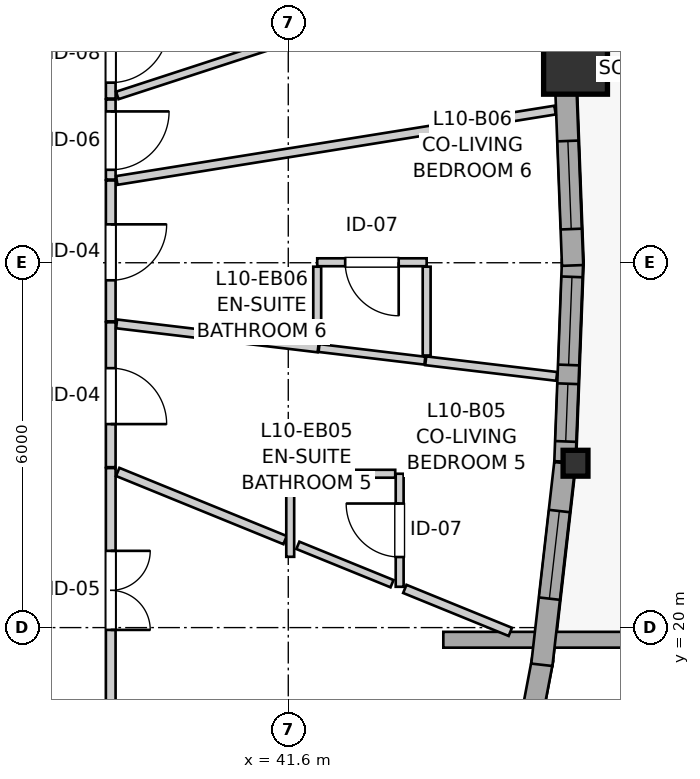
"""IFC4 building model, lengths in metres.
Left out: names, types, materials, properties, quantities, classifications, styles, units other than length and angle.
Written with IfcOpenShell. Run it as: python <this file> out.ifc"""

import sys

from ifc_helpers import new_model, si_unit, direction, frame, frame_2d, origin, origin_2d, place, context, subcontext, project, spatial, rectangle, i_section, extrude, source, transform, mapped, element, fill, save


model = new_model("IFC4")
c1 = context("Model", 3, precision=1e-05, world=origin(), true_north=direction((0.0, 1.0)))
c2 = subcontext(c1, "Body", "Model", "MODEL_VIEW")
j1 = project(units=[si_unit("LENGTHUNIT", "METRE"), si_unit("PLANEANGLEUNIT", "RADIAN")], contexts=[c1])
p1 = place(None, origin())
s1 = spatial("IfcSite", under=j1, at=p1, CompositionType="ELEMENT")
p2 = place(p1, origin())
s2 = spatial("IfcBuilding", under=s1, at=p2, CompositionType="ELEMENT")
p3 = place(p2, frame((0.0, 0.0, 36.6)))
s3 = spatial("IfcBuildingStorey", under=s2, at=p3, CompositionType="ELEMENT", Elevation=36.6)
m1 = source(origin(), c2, "Body", "SweptSolid", [
    extrude(i_section(OverallWidth=0.409, OverallDepth=0.425, WebThickness=0.03, FlangeThickness=0.048, FilletRadius=0.015, at=origin_2d()), origin(), (0.0, 0.0, 1.0), 2.94),
])
p4 = place(p3, frame((46.324, 22.703, 0.0), z_axis=(0.0, 0.0, 1.0), x_axis=(1.0, 0.0, 0.0)))
e1 = element("IfcColumn", 1, at=p4, inside=s3, PredefinedType="PILASTER", context=c2, shape_type="MappedRepresentation", body=[
    mapped(m1, transform((0.0, 0.0, 0.0), x_axis=(1.0, 0.0, 0.0), y_axis=(0.0, 1.0, 0.0), z_axis=(0.0, 0.0, 1.0), scale=1.0)),
])
m2 = source(origin(), c2, "Body", "SweptSolid", [
    extrude(rectangle(XDim=1.05, YDim=1.05, at=origin_2d()), origin(), (0.0, 0.0, 1.0), 2.94),
])
p5 = place(p3, frame((46.324, 29.297, 0.0), z_axis=(0.0, 0.0, 1.0), x_axis=(1.0, 0.0, 0.0)))
e2 = element("IfcColumn", 2, at=p5, inside=s3, PredefinedType="COLUMN", context=c2, shape_type="MappedRepresentation", body=[
    mapped(m2, transform((0.0, 0.0, 0.0), x_axis=(1.0, 0.0, 0.0), y_axis=(0.0, 1.0, 0.0), z_axis=(0.0, 0.0, 1.0), scale=1.0)),
])
p6 = place(p3, frame((44.15, 19.8, 0.0), z_axis=(0.0, 0.0, 1.0), x_axis=(1.0, 0.0, 0.0)))
e3 = element("IfcWall", 3, at=p6, inside=s3, PredefinedType="PARAPET", context=c2, shape_type="SweptSolid", body=[
    extrude(rectangle(XDim=21.104, YDim=0.26, at=frame_2d((10.552, 0.0))), origin(), (0.0, 0.0, 1.0), 0.55),
])
p7 = place(p3, frame((45.206, 16.437, 0.0), z_axis=(0.0, 0.0, 1.0), x_axis=(0.186622565297, 0.982431686237, 0.0)))
e4 = element("IfcWall", 4, at=p7, inside=s3, PredefinedType="SOLIDWALL", context=c2, shape_type="SweptSolid", body=[
    extrude(rectangle(XDim=3.094, YDim=0.35, at=frame_2d((1.547, 0.0))), origin(), (0.0, 0.0, 1.0), 2.42),
])
p8 = place(p7, frame((0.817, 0.0, 0.82)))
e5 = element("IfcOpeningElement", 5, at=p8, cuts=e4, PredefinedType="OPENING", context=c2, shape_type="SweptSolid", body=[
    extrude(rectangle(XDim=1.45, YDim=1.25, at=frame_2d((0.725, 0.625))), frame((0.0, 0.185, 0.0), z_axis=(0.0, -1.0, 0.0), x_axis=(1.0, 0.0, 0.0)), (0.0, 0.0, 1.0), 0.37),
])
p9 = place(p3, frame((45.77, 19.388, 0.0), z_axis=(0.0, 0.0, 1.0), x_axis=(0.113282408476, 0.993562829382, 0.0)))
e6 = element("IfcWall", 6, at=p9, inside=s3, PredefinedType="SOLIDWALL", context=c2, shape_type="SweptSolid", body=[
    extrude(rectangle(XDim=3.336, YDim=0.35, at=frame_2d((1.668, 0.0))), origin(), (0.0, 0.0, 1.0), 2.42),
])
p10 = place(p9, frame((1.095, 0.0, 0.82)))
e7 = element("IfcOpeningElement", 7, at=p10, cuts=e6, PredefinedType="OPENING", context=c2, shape_type="SweptSolid", body=[
    extrude(rectangle(XDim=1.45, YDim=1.25, at=frame_2d((0.725, 0.625))), frame((0.0, 0.185, 0.0), z_axis=(0.0, -1.0, 0.0), x_axis=(1.0, 0.0, 0.0)), (0.0, 0.0, 1.0), 0.37),
])
p11 = place(p3, frame((46.15, 22.729, 0.0), z_axis=(0.0, 0.0, 1.0), x_axis=(0.03797244671, 0.999278786571, 0.0)))
e8 = element("IfcWall", 8, at=p11, inside=s3, PredefinedType="SOLIDWALL", context=c2, shape_type="SweptSolid", body=[
    extrude(rectangle(XDim=3.318, YDim=0.35, at=frame_2d((1.659, 0.0))), origin(), (0.0, 0.0, 1.0), 2.42),
])
p12 = place(p11, frame((0.332, 0.0, 0.82)))
e9 = element("IfcOpeningElement", 9, at=p12, cuts=e8, PredefinedType="OPENING", context=c2, shape_type="SweptSolid", body=[
    extrude(rectangle(XDim=0.95, YDim=1.35, at=frame_2d((0.475, 0.675))), frame((0.0, 0.185, 0.0), z_axis=(0.0, -1.0, 0.0), x_axis=(1.0, 0.0, 0.0)), (0.0, 0.0, 1.0), 0.37),
])
p13 = place(p11, frame((1.59, 0.0, 0.82)))
e10 = element("IfcOpeningElement", 10, at=p13, cuts=e8, PredefinedType="OPENING", context=c2, shape_type="SweptSolid", body=[
    extrude(rectangle(XDim=1.45, YDim=1.25, at=frame_2d((0.725, 0.625))), frame((0.0, 0.185, 0.0), z_axis=(0.0, -1.0, 0.0), x_axis=(1.0, 0.0, 0.0)), (0.0, 0.0, 1.0), 0.37),
])
p14 = place(p3, frame((46.276, 25.955, 0.0), z_axis=(0.0, 0.0, 1.0), x_axis=(-0.037939203929, 0.999280049238, 0.0)))
e11 = element("IfcWall", 11, at=p14, inside=s3, PredefinedType="SOLIDWALL", context=c2, shape_type="SweptSolid", body=[
    extrude(rectangle(XDim=3.037, YDim=0.35, at=frame_2d((1.519, 0.0))), origin(), (0.0, 0.0, 1.0), 2.42),
])
p15 = place(p14, frame((0.599, 0.0, 0.82)))
e12 = element("IfcOpeningElement", 12, at=p15, cuts=e11, PredefinedType="OPENING", context=c2, shape_type="SweptSolid", body=[
    extrude(rectangle(XDim=1.45, YDim=1.25, at=frame_2d((0.725, 0.625))), frame((0.0, 0.185, 0.0), z_axis=(0.0, -1.0, 0.0), x_axis=(1.0, 0.0, 0.0)), (0.0, 0.0, 1.0), 0.37),
])
p16 = place(p3, frame((38.68, 22.623, 0.0), z_axis=(0.0, 0.0, 1.0), x_axis=(0.0, -1.0, 0.0)))
e13 = element("IfcWall", 13, at=p16, inside=s3, PredefinedType="PARTITIONING", context=c2, shape_type="SweptSolid", body=[
    extrude(rectangle(XDim=4.026, YDim=0.16, at=frame_2d((2.013, 0.0))), origin(), (0.0, 0.0, 1.0), 2.94),
])
p17 = place(p16, frame((1.361, 0.0, 0.0)))
e14 = element("IfcOpeningElement", 14, at=p17, cuts=e13, PredefinedType="OPENING", context=c2, shape_type="SweptSolid", body=[
    extrude(rectangle(XDim=1.3, YDim=2.1, at=frame_2d((0.65, 1.05))), frame((0.0, 0.09, 0.0), z_axis=(0.0, -1.0, 0.0), x_axis=(1.0, 0.0, 0.0)), (0.0, 0.0, 1.0), 0.18),
])
p18 = place(p3, frame((38.68, 25.021, 0.0), z_axis=(0.0, 0.0, 1.0), x_axis=(0.0, -1.0, 0.0)))
e15 = element("IfcWall", 15, at=p18, inside=s3, PredefinedType="PARTITIONING", context=c2, shape_type="SweptSolid", body=[
    extrude(rectangle(XDim=2.383, YDim=0.16, at=frame_2d((1.191, 0.0))), origin(), (0.0, 0.0, 1.0), 2.94),
])
p19 = place(p18, frame((0.754, 0.0, 0.0)))
e16 = element("IfcOpeningElement", 16, at=p19, cuts=e15, PredefinedType="OPENING", context=c2, shape_type="SweptSolid", body=[
    extrude(rectangle(XDim=0.92, YDim=2.1, at=frame_2d((0.46, 1.05))), frame((0.0, 0.09, 0.0), z_axis=(0.0, -1.0, 0.0), x_axis=(1.0, 0.0, 0.0)), (0.0, 0.0, 1.0), 0.18),
])
p20 = place(p3, frame((38.68, 27.353, 0.0), z_axis=(0.0, 0.0, 1.0), x_axis=(0.0, -1.0, 0.0)))
e17 = element("IfcWall", 17, at=p20, inside=s3, PredefinedType="PARTITIONING", context=c2, shape_type="SweptSolid", body=[
    extrude(rectangle(XDim=2.317, YDim=0.16, at=frame_2d((1.159, 0.0))), origin(), (0.0, 0.0, 1.0), 2.94),
])
p21 = place(p20, frame((0.721, 0.0, 0.0)))
e18 = element("IfcOpeningElement", 18, at=p21, cuts=e17, PredefinedType="OPENING", context=c2, shape_type="SweptSolid", body=[
    extrude(rectangle(XDim=0.92, YDim=2.1, at=frame_2d((0.46, 1.05))), frame((0.0, 0.09, 0.0), z_axis=(0.0, -1.0, 0.0), x_axis=(1.0, 0.0, 0.0)), (0.0, 0.0, 1.0), 0.18),
])
p22 = place(p3, frame((43.432, 20.671, 0.0), z_axis=(0.0, 0.0, 1.0), x_axis=(0.0, 1.0, 0.0)))
e19 = element("IfcWall", 19, at=p22, inside=s3, PredefinedType="PARTITIONING", context=c2, shape_type="SweptSolid", body=[
    extrude(rectangle(XDim=1.859, YDim=0.13, at=frame_2d((0.93, 0.0))), origin(), (0.0, 0.0, 1.0), 2.94),
])
p23 = place(p22, frame((0.49, 0.0, 0.0)))
e20 = element("IfcOpeningElement", 20, at=p23, cuts=e19, PredefinedType="OPENING", context=c2, shape_type="SweptSolid", body=[
    extrude(rectangle(XDim=0.88, YDim=2.05, at=frame_2d((0.44, 1.025))), frame((0.0, 0.075, 0.0), z_axis=(0.0, -1.0, 0.0), x_axis=(1.0, 0.0, 0.0)), (0.0, 0.0, 1.0), 0.15),
])
p24 = place(p3, frame((43.876, 26.008, 0.0), z_axis=(0.0, 0.0, 1.0), x_axis=(-1.0, 0.0, 0.0)))
e21 = element("IfcWall", 21, at=p24, inside=s3, PredefinedType="PARTITIONING", context=c2, shape_type="SweptSolid", body=[
    extrude(rectangle(XDim=1.8, YDim=0.13, at=frame_2d((0.9, 0.0))), origin(), (0.0, 0.0, 1.0), 2.94),
])
p25 = place(p24, frame((0.46, 0.0, 0.0)))
e22 = element("IfcOpeningElement", 22, at=p25, cuts=e21, PredefinedType="OPENING", context=c2, shape_type="SweptSolid", body=[
    extrude(rectangle(XDim=0.88, YDim=2.05, at=frame_2d((0.44, 1.025))), frame((0.0, 0.075, 0.0), z_axis=(0.0, -1.0, 0.0), x_axis=(1.0, 0.0, 0.0)), (0.0, 0.0, 1.0), 0.15),
])
p26 = place(p3, frame((38.68, 30.126, 0.0), z_axis=(0.0, 0.0, 1.0), x_axis=(0.0, -1.0, 0.0)))
e23 = element("IfcWall", 23, at=p26, inside=s3, PredefinedType="PARTITIONING", context=c2, shape_type="SweptSolid", body=[
    extrude(rectangle(XDim=1.426, YDim=0.16, at=frame_2d((0.713, 0.0))), origin(), (0.0, 0.0, 1.0), 2.94),
])
p27 = place(p26, frame((0.214, 0.0, 0.0)))
e24 = element("IfcOpeningElement", 24, at=p27, cuts=e23, PredefinedType="OPENING", context=c2, shape_type="SweptSolid", body=[
    extrude(rectangle(XDim=0.95, YDim=2.1, at=frame_2d((0.475, 1.05))), frame((0.0, 0.09, 0.0), z_axis=(0.0, -1.0, 0.0), x_axis=(1.0, 0.0, 0.0)), (0.0, 0.0, 1.0), 0.18),
])
p28 = place(p3, frame((38.68, 28.685, 0.0), z_axis=(0.0, 0.0, 1.0), x_axis=(0.0, -1.0, 0.0)))
e25 = element("IfcWall", 25, at=p28, inside=s3, PredefinedType="PARTITIONING", context=c2, shape_type="SweptSolid", body=[
    extrude(rectangle(XDim=1.317, YDim=0.16, at=frame_2d((0.659, 0.0))), origin(), (0.0, 0.0, 1.0), 2.94),
])
p29 = place(p28, frame((0.196, 0.0, 0.0)))
e26 = element("IfcOpeningElement", 26, at=p29, cuts=e25, PredefinedType="OPENING", context=c2, shape_type="SweptSolid", body=[
    extrude(rectangle(XDim=0.96, YDim=2.1, at=frame_2d((0.48, 1.05))), frame((0.0, 0.09, 0.0), z_axis=(0.0, -1.0, 0.0), x_axis=(1.0, 0.0, 0.0)), (0.0, 0.0, 1.0), 0.18),
])
p30 = place(p3, frame((38.788, 28.751, 0.0), z_axis=(0.0, 0.0, 1.0), x_axis=(0.95075822996, 0.309933522169, 0.0)))
e27 = element("IfcWall", 27, at=p30, inside=s3, PredefinedType="PARTITIONING", context=c2, shape_type="SweptSolid", body=[
    extrude(rectangle(XDim=7.327, YDim=0.13, at=frame_2d((3.664, 0.0))), origin(), (0.0, 0.0, 1.0), 2.94),
])
p31 = place(p3, frame((38.779, 27.353, 0.0), z_axis=(0.0, 0.0, 1.0), x_axis=(0.987345710334, 0.158582622897, 0.0)))
e28 = element("IfcWall", 28, at=p31, inside=s3, PredefinedType="PARTITIONING", context=c2, shape_type="SweptSolid", body=[
    extrude(rectangle(XDim=7.3, YDim=0.145, at=frame_2d((3.65, 0.0))), origin(), (0.0, 0.0, 1.0), 2.94),
])
p32 = place(p3, frame((38.777, 24.994, 0.0), z_axis=(0.0, 0.0, 1.0), x_axis=(0.992964132073, -0.1184155075, 0.0)))
e29 = element("IfcWall", 29, at=p32, inside=s3, PredefinedType="PARTITIONING", context=c2, shape_type="SweptSolid", body=[
    extrude(rectangle(XDim=3.338, YDim=0.145, at=frame_2d((1.669, 0.0))), origin(), (0.0, 0.0, 1.0), 2.94),
])
p33 = place(p3, frame((38.795, 22.56, 0.0), z_axis=(0.0, 0.0, 1.0), x_axis=(0.926055147025, -0.377388214799, 0.0)))
e30 = element("IfcWall", 30, at=p33, inside=s3, PredefinedType="PARTITIONING", context=c2, shape_type="SweptSolid", body=[
    extrude(rectangle(XDim=2.972, YDim=0.145, at=frame_2d((1.486, 0.0))), origin(), (0.0, 0.0, 1.0), 2.94),
])
p34 = place(p3, frame((43.517, 20.636, 0.0), z_axis=(0.0, 0.0, 1.0), x_axis=(0.926048504925, -0.377404513124, 0.0)))
e31 = element("IfcWall", 31, at=p34, inside=s3, PredefinedType="PARTITIONING", context=c2, shape_type="SweptSolid", body=[
    extrude(rectangle(XDim=1.873, YDim=0.145, at=frame_2d((0.937, 0.0))), origin(), (0.0, 0.0, 1.0), 2.94),
])
p35 = place(p3, frame((43.861, 24.388, 0.0), z_axis=(0.0, 0.0, 1.0), x_axis=(0.992948573357, -0.118545901105, 0.0)))
e32 = element("IfcWall", 32, at=p35, inside=s3, PredefinedType="PARTITIONING", context=c2, shape_type="SweptSolid", body=[
    extrude(rectangle(XDim=2.169, YDim=0.145, at=frame_2d((1.084, 0.0))), origin(), (0.0, 0.0, 1.0), 2.94),
])
p36 = place(p3, frame((41.758, 21.353, 0.0), z_axis=(0.0, 0.0, 1.0), x_axis=(0.926203809775, -0.377023212492, 0.0)))
e33 = element("IfcWall", 33, at=p36, inside=s3, PredefinedType="PARTITIONING", context=c2, shape_type="SweptSolid", body=[
    extrude(rectangle(XDim=1.672, YDim=0.13, at=frame_2d((0.836, 0.0))), origin(), (0.0, 0.0, 1.0), 2.94),
])
p37 = place(p3, frame((41.705, 22.53, 0.0), z_axis=(0.0, 0.0, 1.0), x_axis=(1.0, 0.0, 0.0)))
e34 = element("IfcWall", 34, at=p37, inside=s3, PredefinedType="PARTITIONING", context=c2, shape_type="SweptSolid", body=[
    extrude(rectangle(XDim=1.654, YDim=0.13, at=frame_2d((0.827, 0.0))), origin(), (0.0, 0.0, 1.0), 2.94),
])
p38 = place(p3, frame((42.106, 24.598, 0.0), z_axis=(0.0, 0.0, 1.0), x_axis=(0.992915674768, -0.118821137848, 0.0)))
e35 = element("IfcWall", 35, at=p38, inside=s3, PredefinedType="PARTITIONING", context=c2, shape_type="SweptSolid", body=[
    extrude(rectangle(XDim=1.753, YDim=0.13, at=frame_2d((0.876, 0.0))), origin(), (0.0, 0.0, 1.0), 2.94),
])
p39 = place(p3, frame((43.876, 24.475, 0.0), z_axis=(0.0, 0.0, 1.0), x_axis=(0.0, 1.0, 0.0)))
e36 = element("IfcWall", 36, at=p39, inside=s3, PredefinedType="PARTITIONING", context=c2, shape_type="SweptSolid", body=[
    extrude(rectangle(XDim=1.46, YDim=0.13, at=frame_2d((0.73, 0.0))), origin(), (0.0, 0.0, 1.0), 2.94),
])
p40 = place(p3, frame((42.076, 24.69, 0.0), z_axis=(0.0, 0.0, 1.0), x_axis=(0.0, 1.0, 0.0)))
e37 = element("IfcWall", 37, at=p40, inside=s3, PredefinedType="PARTITIONING", context=c2, shape_type="SweptSolid", body=[
    extrude(rectangle(XDim=1.245, YDim=0.13, at=frame_2d((0.623, 0.0))), origin(), (0.0, 0.0, 1.0), 2.94),
])
p41 = place(p3, frame((41.632, 21.164, 0.0), z_axis=(0.0, 0.0, 1.0), x_axis=(0.0, 1.0, 0.0)))
e38 = element("IfcWall", 38, at=p41, inside=s3, PredefinedType="PARTITIONING", context=c2, shape_type="SweptSolid", body=[
    extrude(rectangle(XDim=1.606, YDim=0.13, at=frame_2d((0.803, 0.0))), origin(), (0.0, 0.0, 1.0), 2.94),
])
m3 = source(origin(), c2, "Body", "SweptSolid", [
    extrude(rectangle(XDim=1.45, YDim=1.25, at=frame_2d((0.725, 0.625))), frame((0.0, 0.03, 0.0), z_axis=(0.0, -1.0, 0.0), x_axis=(1.0, 0.0, 0.0)), (0.0, 0.0, 1.0), 0.06),
])
p42 = place(p10, origin())
e39 = element("IfcWindow", 39, at=p42, inside=s3, PartitioningType="SINGLE_PANEL", PredefinedType="WINDOW", context=c2, shape_type="MappedRepresentation", body=[
    mapped(m3, transform((0.0, 0.0, 0.0), x_axis=(1.0, 0.0, 0.0), y_axis=(0.0, 1.0, 0.0), z_axis=(0.0, 0.0, 1.0), scale=1.0)),
])
fill(e7, e39)
m4 = source(origin(), c2, "Body", "SweptSolid", [
    extrude(rectangle(XDim=0.95, YDim=1.35, at=frame_2d((0.475, 0.675))), frame((0.0, 0.03, 0.0), z_axis=(0.0, -1.0, 0.0), x_axis=(1.0, 0.0, 0.0)), (0.0, 0.0, 1.0), 0.06),
])
p43 = place(p12, origin())
e40 = element("IfcWindow", 40, at=p43, inside=s3, PartitioningType="SINGLE_PANEL", PredefinedType="WINDOW", context=c2, shape_type="MappedRepresentation", body=[
    mapped(m4, transform((0.0, 0.0, 0.0), x_axis=(1.0, 0.0, 0.0), y_axis=(0.0, 1.0, 0.0), z_axis=(0.0, 0.0, 1.0), scale=1.0)),
])
fill(e9, e40)
p44 = place(p13, origin())
e41 = element("IfcWindow", 41, at=p44, inside=s3, PartitioningType="SINGLE_PANEL", PredefinedType="WINDOW", context=c2, shape_type="MappedRepresentation", body=[
    mapped(m3, transform((0.0, 0.0, 0.0), x_axis=(1.0, 0.0, 0.0), y_axis=(0.0, 1.0, 0.0), z_axis=(0.0, 0.0, 1.0), scale=1.0)),
])
fill(e10, e41)
p45 = place(p15, origin())
e42 = element("IfcWindow", 42, at=p45, inside=s3, PartitioningType="SINGLE_PANEL", PredefinedType="WINDOW", context=c2, shape_type="MappedRepresentation", body=[
    mapped(m3, transform((0.0, 0.0, 0.0), x_axis=(1.0, 0.0, 0.0), y_axis=(0.0, 1.0, 0.0), z_axis=(0.0, 0.0, 1.0), scale=1.0)),
])
fill(e12, e42)
m5 = source(origin(), c2, "Body", "SweptSolid", [
    extrude(rectangle(XDim=1.3, YDim=2.1, at=frame_2d((0.65, 1.05))), frame((0.0, 0.025, 0.0), z_axis=(0.0, -1.0, 0.0), x_axis=(1.0, 0.0, 0.0)), (0.0, 0.0, 1.0), 0.05),
])
p46 = place(p17, origin())
e43 = element("IfcDoor", 43, at=p46, inside=s3, OperationType="DOUBLE_DOOR_SINGLE_SWING", PredefinedType="DOOR", context=c2, shape_type="MappedRepresentation", body=[
    mapped(m5, transform((0.0, 0.0, 0.0), x_axis=(1.0, 0.0, 0.0), y_axis=(0.0, 1.0, 0.0), z_axis=(0.0, 0.0, 1.0), scale=1.0)),
])
fill(e14, e43)
m6 = source(origin(), c2, "Body", "SweptSolid", [
    extrude(rectangle(XDim=0.92, YDim=2.1, at=frame_2d((0.46, 1.05))), frame((0.0, 0.025, 0.0), z_axis=(0.0, -1.0, 0.0), x_axis=(1.0, 0.0, 0.0)), (0.0, 0.0, 1.0), 0.05),
])
p47 = place(p19, origin())
e44 = element("IfcDoor", 44, at=p47, inside=s3, OperationType="SINGLE_SWING_RIGHT", PredefinedType="DOOR", context=c2, shape_type="MappedRepresentation", body=[
    mapped(m6, transform((0.0, 0.0, 0.0), x_axis=(1.0, 0.0, 0.0), y_axis=(0.0, 1.0, 0.0), z_axis=(0.0, 0.0, 1.0), scale=1.0)),
])
fill(e16, e44)
p48 = place(p21, origin())
e45 = element("IfcDoor", 45, at=p48, inside=s3, OperationType="SINGLE_SWING_LEFT", PredefinedType="DOOR", context=c2, shape_type="MappedRepresentation", body=[
    mapped(m6, transform((0.0, 0.0, 0.0), x_axis=(1.0, 0.0, 0.0), y_axis=(0.0, 1.0, 0.0), z_axis=(0.0, 0.0, 1.0), scale=1.0)),
])
fill(e18, e45)
m7 = source(origin(), c2, "Body", "SweptSolid", [
    extrude(rectangle(XDim=0.88, YDim=2.05, at=frame_2d((0.44, 1.025))), frame((0.0, 0.025, 0.0), z_axis=(0.0, -1.0, 0.0), x_axis=(1.0, 0.0, 0.0)), (0.0, 0.0, 1.0), 0.05),
])
p49 = place(p23, origin())
e46 = element("IfcDoor", 46, at=p49, inside=s3, OperationType="SINGLE_SWING_RIGHT", PredefinedType="DOOR", context=c2, shape_type="MappedRepresentation", body=[
    mapped(m7, transform((0.0, 0.0, 0.0), x_axis=(1.0, 0.0, 0.0), y_axis=(0.0, 1.0, 0.0), z_axis=(0.0, 0.0, 1.0), scale=1.0)),
])
fill(e20, e46)
p50 = place(p25, origin())
e47 = element("IfcDoor", 47, at=p50, inside=s3, OperationType="SINGLE_SWING_LEFT", PredefinedType="DOOR", context=c2, shape_type="MappedRepresentation", body=[
    mapped(m7, transform((0.0, 0.0, 0.0), x_axis=(1.0, 0.0, 0.0), y_axis=(0.0, 1.0, 0.0), z_axis=(0.0, 0.0, 1.0), scale=1.0)),
])
fill(e22, e47)
m8 = source(origin(), c2, "Body", "SweptSolid", [
    extrude(rectangle(XDim=0.95, YDim=2.1, at=frame_2d((0.475, 1.05))), frame((0.0, 0.025, 0.0), z_axis=(0.0, -1.0, 0.0), x_axis=(1.0, 0.0, 0.0)), (0.0, 0.0, 1.0), 0.05),
])
p51 = place(p27, origin())
e48 = element("IfcDoor", 48, at=p51, inside=s3, OperationType="SINGLE_SWING_LEFT", PredefinedType="DOOR", context=c2, shape_type="MappedRepresentation", body=[
    mapped(m8, transform((0.0, 0.0, 0.0), x_axis=(1.0, 0.0, 0.0), y_axis=(0.0, 1.0, 0.0), z_axis=(0.0, 0.0, 1.0), scale=1.0)),
])
fill(e24, e48)
m9 = source(origin(), c2, "Body", "SweptSolid", [
    extrude(rectangle(XDim=0.96, YDim=2.1, at=frame_2d((0.48, 1.05))), frame((0.0, 0.025, 0.0), z_axis=(0.0, -1.0, 0.0), x_axis=(1.0, 0.0, 0.0)), (0.0, 0.0, 1.0), 0.05),
])
p52 = place(p29, origin())
e49 = element("IfcDoor", 49, at=p52, inside=s3, OperationType="SINGLE_SWING_LEFT", PredefinedType="DOOR", context=c2, shape_type="MappedRepresentation", body=[
    mapped(m9, transform((0.0, 0.0, 0.0), x_axis=(1.0, 0.0, 0.0), y_axis=(0.0, 1.0, 0.0), z_axis=(0.0, 0.0, 1.0), scale=1.0)),
])
fill(e26, e49)
save(model, sys.argv[1])
